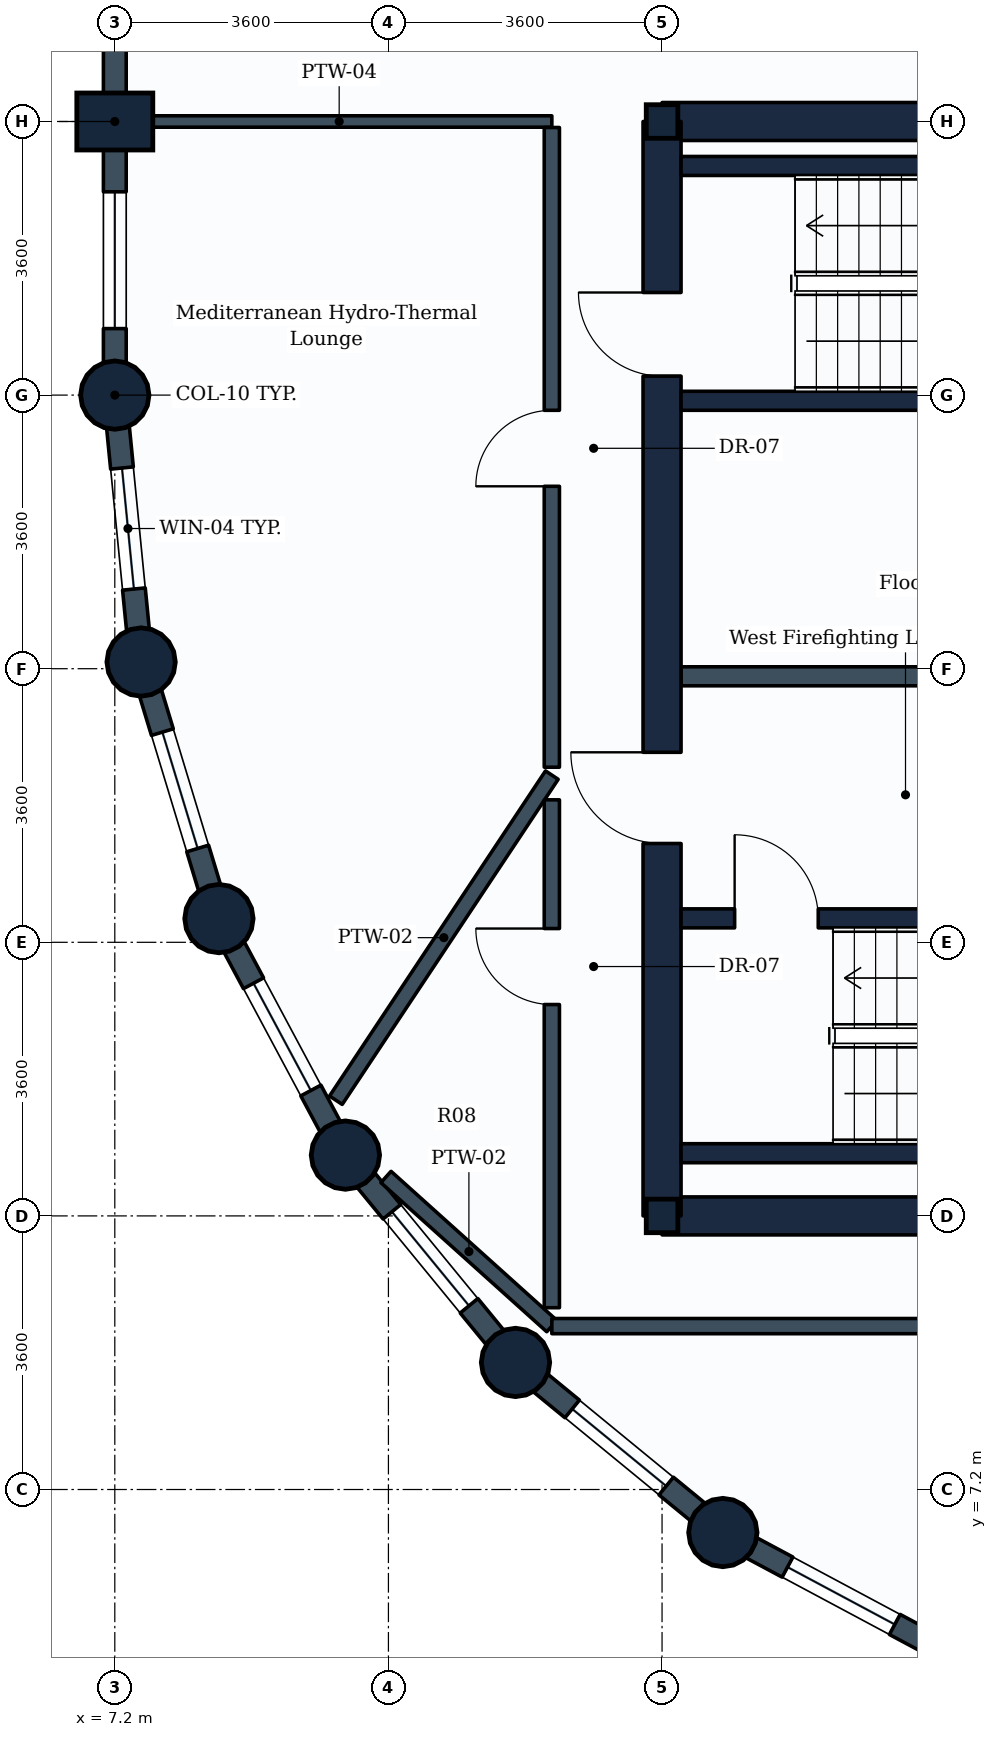
"""IFC4 building model, lengths in metres.
Left out: names, types, materials, properties, quantities, classifications, styles, units other than length and angle.
Written with IfcOpenShell. Run it as: python <this file> out.ifc"""

import sys

from ifc_helpers import new_model, si_unit, direction, frame, frame_2d, origin, origin_2d, place, context, subcontext, project, spatial, rectangle, circle, i_section, extrude, element, fill, save


model = new_model("IFC4")
c1 = context("Model", 3, precision=1e-05, world=origin(), true_north=direction((0.0, 1.0)))
c2 = subcontext(c1, "Body", "Model", "MODEL_VIEW")
j1 = project(units=[si_unit("LENGTHUNIT", "METRE"), si_unit("PLANEANGLEUNIT", "RADIAN")], contexts=[c1])
p1 = place(None, origin())
s1 = spatial("IfcSite", under=j1, at=p1, CompositionType="ELEMENT")
p2 = place(p1, origin())
s2 = spatial("IfcBuilding", under=s1, at=p2, CompositionType="ELEMENT")
p3 = place(p2, frame((0.0, 0.0, 165.6)))
s3 = spatial("IfcBuildingStorey", under=s2, at=p3, CompositionType="ELEMENT", Elevation=165.6)
p4 = place(p3, frame((7.2, 21.6, 0.0), z_axis=(0.0, 0.0, 1.0), x_axis=(1.0, 0.0, 0.0)))
e1 = element("IfcColumn", 1, at=p4, inside=s3, PredefinedType="COLUMN", context=c2, shape_type="SweptSolid", body=[
    extrude(circle(Radius=0.45, at=origin_2d()), origin(), (0.0, 0.0, 1.0), 3.8),
])
p5 = place(p3, frame((7.2, 25.2, 0.0), z_axis=(0.0, 0.0, 1.0), x_axis=(0.0, 1.0, 0.0)))
e2 = element("IfcColumn", 2, at=p5, inside=s3, PredefinedType="COLUMN", context=c2, shape_type="SweptSolid", body=[
    extrude(rectangle(XDim=0.75, YDim=1.0, at=origin_2d()), origin(), (0.0, 0.0, 1.0), 3.8),
])
for number, where, z_axis, x_axis in (
    (3, (7.546, 18.088, 0.0), (0.0, 0.0, 1.0), (1.0, 0.0, 0.0)),
    (4, (8.57, 14.712, 0.0), (0.0, 0.0, 1.0), (1.0, 0.0, 0.0)),
    (5, (10.234, 11.6, 0.0), (0.0, 0.0, 1.0), (1.0, 0.0, 0.0)),
    (6, (12.472, 8.872, 0.0), (0.0, 0.0, 1.0), (1.0, 0.0, 0.0)),
):
    element("IfcColumn", number, at=place(p3, frame(where, z_axis=z_axis, x_axis=x_axis)), inside=s3, PredefinedType="COLUMN", context=c2, shape_type="SweptSolid", body=[
        extrude(circle(Radius=0.45, at=origin_2d()), origin(), (0.0, 0.0, 1.0), 3.8),
    ])
for number, where, z_axis, x_axis in (
    (7, (14.4, 10.8, 0.0), (0.0, 0.0, 1.0), (1.0, 0.0, 0.0)),
    (8, (14.4, 25.2, 0.0), (0.0, 0.0, 1.0), (1.0, 0.0, 0.0)),
):
    element("IfcColumn", number, at=place(p3, frame(where, z_axis=z_axis, x_axis=x_axis)), inside=s3, PredefinedType="COLUMN", context=c2, shape_type="SweptSolid", body=[
        extrude(i_section(OverallWidth=0.416, OverallDepth=0.442, WebThickness=0.025, FlangeThickness=0.041, FilletRadius=0.015, at=origin_2d()), origin(), (0.0, 0.0, 1.0), 3.8),
    ])
p6 = place(p3, frame((15.2, 6.634, 0.0), z_axis=(0.0, 0.0, 1.0), x_axis=(1.0, 0.0, 0.0)))
e9 = element("IfcColumn", 9, at=p6, inside=s3, PredefinedType="COLUMN", context=c2, shape_type="SweptSolid", body=[
    extrude(circle(Radius=0.45, at=origin_2d()), origin(), (0.0, 0.0, 1.0), 3.8),
])
p7 = place(p3, frame((7.2, 25.2, 0.0), z_axis=(0.0, 0.0, 1.0), x_axis=(0.0, 1.0, 0.0)))
e10 = element("IfcWall", 10, at=p7, inside=s3, PredefinedType="STANDARD", context=c2, shape_type="SweptSolid", body=[
    extrude(rectangle(XDim=3.6, YDim=0.3, at=frame_2d((1.8, 0.0))), origin(), (0.0, 0.0, 1.0), 2.93),
])
p8 = place(p3, frame((7.2, 21.6, 0.0), z_axis=(0.0, 0.0, 1.0), x_axis=(0.0, 1.0, 0.0)))
e11 = element("IfcWall", 11, at=p8, inside=s3, PredefinedType="STANDARD", context=c2, shape_type="SweptSolid", body=[
    extrude(rectangle(XDim=3.6, YDim=0.3, at=frame_2d((1.8, 0.0))), origin(), (0.0, 0.0, 1.0), 2.93),
])
p9 = place(p8, frame((0.875, 0.0, 0.85)))
e12 = element("IfcOpeningElement", 12, at=p9, cuts=e11, PredefinedType="OPENING", context=c2, shape_type="SweptSolid", body=[
    extrude(rectangle(XDim=1.8, YDim=1.35, at=frame_2d((0.9, 0.675))), frame((0.0, 0.16, 0.0), z_axis=(0.0, -1.0, 0.0), x_axis=(1.0, 0.0, 0.0)), (0.0, 0.0, 1.0), 0.32),
])
p10 = place(p3, frame((7.546, 18.088, 0.0), z_axis=(0.0, 0.0, 1.0), x_axis=(-0.09802417461, 0.995184033831, 0.0)))
e13 = element("IfcWall", 13, at=p10, inside=s3, PredefinedType="STANDARD", context=c2, shape_type="SweptSolid", body=[
    extrude(rectangle(XDim=3.529, YDim=0.3, at=frame_2d((1.765, 0.0))), origin(), (0.0, 0.0, 1.0), 2.93),
])
p11 = place(p10, frame((0.965, 0.0, 0.85)))
e14 = element("IfcOpeningElement", 14, at=p11, cuts=e13, PredefinedType="OPENING", context=c2, shape_type="SweptSolid", body=[
    extrude(rectangle(XDim=1.6, YDim=1.35, at=frame_2d((0.8, 0.675))), frame((0.0, 0.16, 0.0), z_axis=(0.0, -1.0, 0.0), x_axis=(1.0, 0.0, 0.0)), (0.0, 0.0, 1.0), 0.32),
])
p12 = place(p3, frame((8.57, 14.712, 0.0), z_axis=(0.0, 0.0, 1.0), x_axis=(-0.290305086481, 0.956934144423, 0.0)))
e15 = element("IfcWall", 15, at=p12, inside=s3, PredefinedType="STANDARD", context=c2, shape_type="SweptSolid", body=[
    extrude(rectangle(XDim=3.528, YDim=0.3, at=frame_2d((1.764, 0.0))), origin(), (0.0, 0.0, 1.0), 2.93),
])
p13 = place(p12, frame((0.964, 0.0, 0.85)))
e16 = element("IfcOpeningElement", 16, at=p13, cuts=e15, PredefinedType="OPENING", context=c2, shape_type="SweptSolid", body=[
    extrude(rectangle(XDim=1.6, YDim=1.35, at=frame_2d((0.8, 0.675))), frame((0.0, 0.16, 0.0), z_axis=(0.0, -1.0, 0.0), x_axis=(1.0, 0.0, 0.0)), (0.0, 0.0, 1.0), 0.32),
])
p14 = place(p3, frame((10.234, 11.6, 0.0), z_axis=(0.0, 0.0, 1.0), x_axis=(-0.47151087309, 0.881860247748, 0.0)))
e17 = element("IfcWall", 17, at=p14, inside=s3, PredefinedType="STANDARD", context=c2, shape_type="SweptSolid", body=[
    extrude(rectangle(XDim=3.529, YDim=0.3, at=frame_2d((1.764, 0.0))), origin(), (0.0, 0.0, 1.0), 2.93),
])
p15 = place(p14, frame((0.964, 0.0, 0.85)))
e18 = element("IfcOpeningElement", 18, at=p15, cuts=e17, PredefinedType="OPENING", context=c2, shape_type="SweptSolid", body=[
    extrude(rectangle(XDim=1.6, YDim=1.35, at=frame_2d((0.8, 0.675))), frame((0.0, 0.16, 0.0), z_axis=(0.0, -1.0, 0.0), x_axis=(1.0, 0.0, 0.0)), (0.0, 0.0, 1.0), 0.32),
])
p16 = place(p3, frame((12.472, 8.872, 0.0), z_axis=(0.0, 0.0, 1.0), x_axis=(-0.634258295121, 0.773121216285, 0.0)))
e19 = element("IfcWall", 19, at=p16, inside=s3, PredefinedType="STANDARD", context=c2, shape_type="SweptSolid", body=[
    extrude(rectangle(XDim=3.529, YDim=0.3, at=frame_2d((1.764, 0.0))), origin(), (0.0, 0.0, 1.0), 2.93),
])
p17 = place(p16, frame((0.964, 0.0, 0.85)))
e20 = element("IfcOpeningElement", 20, at=p17, cuts=e19, PredefinedType="OPENING", context=c2, shape_type="SweptSolid", body=[
    extrude(rectangle(XDim=1.6, YDim=1.35, at=frame_2d((0.8, 0.675))), frame((0.0, 0.16, 0.0), z_axis=(0.0, -1.0, 0.0), x_axis=(1.0, 0.0, 0.0)), (0.0, 0.0, 1.0), 0.32),
])
p18 = place(p3, frame((15.2, 6.634, 0.0), z_axis=(0.0, 0.0, 1.0), x_axis=(-0.773121216285, 0.634258295121, 0.0)))
e21 = element("IfcWall", 21, at=p18, inside=s3, PredefinedType="STANDARD", context=c2, shape_type="SweptSolid", body=[
    extrude(rectangle(XDim=3.529, YDim=0.3, at=frame_2d((1.764, 0.0))), origin(), (0.0, 0.0, 1.0), 2.93),
])
p19 = place(p18, frame((0.964, 0.0, 0.85)))
e22 = element("IfcOpeningElement", 22, at=p19, cuts=e21, PredefinedType="OPENING", context=c2, shape_type="SweptSolid", body=[
    extrude(rectangle(XDim=1.6, YDim=1.35, at=frame_2d((0.8, 0.675))), frame((0.0, 0.16, 0.0), z_axis=(0.0, -1.0, 0.0), x_axis=(1.0, 0.0, 0.0)), (0.0, 0.0, 1.0), 0.32),
])
p20 = place(p3, frame((18.312, 4.97, 0.0), z_axis=(0.0, 0.0, 1.0), x_axis=(-0.881846862014, 0.471535907389, 0.0)))
e23 = element("IfcWall", 23, at=p20, inside=s3, PredefinedType="STANDARD", context=c2, shape_type="SweptSolid", body=[
    extrude(rectangle(XDim=3.529, YDim=0.3, at=frame_2d((1.765, 0.0))), origin(), (0.0, 0.0, 1.0), 2.93),
])
p21 = place(p20, frame((0.964, 0.0, 0.85)))
e24 = element("IfcOpeningElement", 24, at=p21, cuts=e23, PredefinedType="OPENING", context=c2, shape_type="SweptSolid", body=[
    extrude(rectangle(XDim=1.6, YDim=1.35, at=frame_2d((0.8, 0.675))), frame((0.0, 0.16, 0.0), z_axis=(0.0, -1.0, 0.0), x_axis=(1.0, 0.0, 0.0)), (0.0, 0.0, 1.0), 0.32),
])
p22 = place(p3, frame((14.4, 10.8, 0.0), z_axis=(0.0, 0.0, 1.0), x_axis=(1.0, 0.0, 0.0)))
e25 = element("IfcWall", 25, at=p22, inside=s3, PredefinedType="SHEAR", context=c2, shape_type="SweptSolid", body=[
    extrude(rectangle(XDim=18.0, YDim=0.5, at=frame_2d((9.0, 0.0))), origin(), (0.0, 0.0, 1.0), 3.48),
])
p23 = place(p3, frame((14.4, 25.2, 0.0), z_axis=(0.0, 0.0, 1.0), x_axis=(1.0, 0.0, 0.0)))
e26 = element("IfcWall", 26, at=p23, inside=s3, PredefinedType="SHEAR", context=c2, shape_type="SweptSolid", body=[
    extrude(rectangle(XDim=14.4, YDim=0.5, at=frame_2d((7.2, 0.0))), origin(), (0.0, 0.0, 1.0), 3.48),
])
p24 = place(p3, frame((14.4, 10.8, 0.0), z_axis=(0.0, 0.0, 1.0), x_axis=(0.0, 1.0, 0.0)))
e27 = element("IfcWall", 27, at=p24, inside=s3, PredefinedType="SHEAR", context=c2, shape_type="SweptSolid", body=[
    extrude(rectangle(XDim=14.4, YDim=0.5, at=frame_2d((7.2, 0.0))), origin(), (0.0, 0.0, 1.0), 3.48),
])
p25 = place(p24, frame((11.05, 0.0, 0.0)))
e28 = element("IfcOpeningElement", 28, at=p25, cuts=e27, PredefinedType="OPENING", context=c2, shape_type="SweptSolid", body=[
    extrude(rectangle(XDim=1.1, YDim=2.1, at=frame_2d((0.55, 1.05))), frame((0.0, 0.26, 0.0), z_axis=(0.0, -1.0, 0.0), x_axis=(1.0, 0.0, 0.0)), (0.0, 0.0, 1.0), 0.52),
])
p26 = place(p24, frame((4.9, 0.0, 0.0)))
e29 = element("IfcOpeningElement", 29, at=p26, cuts=e27, PredefinedType="OPENING", context=c2, shape_type="SweptSolid", body=[
    extrude(rectangle(XDim=1.2, YDim=2.1, at=frame_2d((0.6, 1.05))), frame((0.0, 0.26, 0.0), z_axis=(0.0, -1.0, 0.0), x_axis=(1.0, 0.0, 0.0)), (0.0, 0.0, 1.0), 0.52),
])
p27 = place(p3, frame((14.65, 11.625, 0.0), z_axis=(0.0, 0.0, 1.0), x_axis=(1.0, 0.0, 0.0)))
e30 = element("IfcWall", 30, at=p27, inside=s3, PredefinedType="SHEAR", context=c2, shape_type="SweptSolid", body=[
    extrude(rectangle(XDim=8.7, YDim=0.25, at=frame_2d((4.35, 0.0))), origin(), (0.0, 0.0, 1.0), 3.48),
])
p28 = place(p3, frame((14.65, 14.715, 0.0), z_axis=(0.0, 0.0, 1.0), x_axis=(1.0, 0.0, 0.0)))
e31 = element("IfcWall", 31, at=p28, inside=s3, PredefinedType="SHEAR", context=c2, shape_type="SweptSolid", body=[
    extrude(rectangle(XDim=8.7, YDim=0.25, at=frame_2d((4.35, 0.0))), origin(), (0.0, 0.0, 1.0), 3.48),
])
p29 = place(p28, frame((0.705, 0.0, 0.0)))
e32 = element("IfcOpeningElement", 32, at=p29, cuts=e31, PredefinedType="OPENING", context=c2, shape_type="SweptSolid", body=[
    extrude(rectangle(XDim=1.1, YDim=2.1, at=frame_2d((0.55, 1.05))), frame((0.0, 0.135, 0.0), z_axis=(0.0, -1.0, 0.0), x_axis=(1.0, 0.0, 0.0)), (0.0, 0.0, 1.0), 0.27),
])
for number, where, z_axis, x_axis in (
    (33, (14.65, 21.525, 0.0), (0.0, 0.0, 1.0), (1.0, 0.0, 0.0)),
    (34, (14.65, 24.615, 0.0), (0.0, 0.0, 1.0), (1.0, 0.0, 0.0)),
):
    element("IfcWall", number, at=place(p3, frame(where, z_axis=z_axis, x_axis=x_axis)), inside=s3, PredefinedType="SHEAR", context=c2, shape_type="SweptSolid", body=[
        extrude(rectangle(XDim=8.25, YDim=0.25, at=frame_2d((4.125, 0.0))), origin(), (0.0, 0.0, 1.0), 3.48),
    ])
p30 = place(p3, frame((14.65, 17.9, 0.0), z_axis=(0.0, 0.0, 1.0), x_axis=(1.0, 0.0, 0.0)))
e35 = element("IfcWall", 35, at=p30, inside=s3, PredefinedType="PARTITIONING", context=c2, shape_type="SweptSolid", body=[
    extrude(rectangle(XDim=7.15, YDim=0.25, at=frame_2d((3.575, 0.0))), origin(), (0.0, 0.0, 1.0), 3.465),
])
p31 = place(p3, frame((7.354, 25.2, 0.0), z_axis=(0.0, 0.0, 1.0), x_axis=(1.0, 0.0, 0.0)))
e36 = element("IfcWall", 36, at=p31, inside=s3, PredefinedType="PARTITIONING", context=c2, shape_type="SweptSolid", body=[
    extrude(rectangle(XDim=5.596, YDim=0.15, at=frame_2d((2.798, 0.0))), origin(), (0.0, 0.0, 1.0), 3.465),
])
p32 = place(p3, frame((12.95, 9.35, 0.0), z_axis=(0.0, 0.0, 1.0), x_axis=(-0.743629108244, 0.66859236413, 0.0)))
e37 = element("IfcWall", 37, at=p32, inside=s3, PredefinedType="PARTITIONING", context=c2, shape_type="SweptSolid", body=[
    extrude(rectangle(XDim=2.935, YDim=0.2, at=frame_2d((1.467, 0.0))), origin(), (0.0, 0.0, 1.0), 2.93),
])
p33 = place(p3, frame((12.95, 16.6, 0.0), z_axis=(0.0, 0.0, 1.0), x_axis=(-0.553273174501, -0.832999876577, 0.0)))
e38 = element("IfcWall", 38, at=p33, inside=s3, PredefinedType="PARTITIONING", context=c2, shape_type="SweptSolid", body=[
    extrude(rectangle(XDim=5.135, YDim=0.2, at=frame_2d((2.568, 0.0))), origin(), (0.0, 0.0, 1.0), 2.93),
])
p34 = place(p3, frame((12.95, 16.704, 0.0), z_axis=(0.0, 0.0, 1.0), x_axis=(0.0, 1.0, 0.0)))
e39 = element("IfcWall", 39, at=p34, inside=s3, PredefinedType="PARTITIONING", context=c2, shape_type="SweptSolid", body=[
    extrude(rectangle(XDim=8.417, YDim=0.2, at=frame_2d((4.208, 0.0))), origin(), (0.0, 0.0, 1.0), 3.11),
])
p35 = place(p34, frame((3.696, 0.0, 0.0)))
e40 = element("IfcOpeningElement", 40, at=p35, cuts=e39, PredefinedType="OPENING", context=c2, shape_type="SweptSolid", body=[
    extrude(rectangle(XDim=1.0, YDim=2.1, at=frame_2d((0.5, 1.05))), frame((0.0, 0.11, 0.0), z_axis=(0.0, -1.0, 0.0), x_axis=(1.0, 0.0, 0.0)), (0.0, 0.0, 1.0), 0.22),
])
p36 = place(p3, frame((12.95, 9.592, 0.0), z_axis=(0.0, 0.0, 1.0), x_axis=(0.0, 1.0, 0.0)))
e41 = element("IfcWall", 41, at=p36, inside=s3, PredefinedType="PARTITIONING", context=c2, shape_type="SweptSolid", body=[
    extrude(rectangle(XDim=6.683, YDim=0.2, at=frame_2d((3.341, 0.0))), origin(), (0.0, 0.0, 1.0), 3.1),
])
p37 = place(p36, frame((3.989, 0.0, 0.0)))
e42 = element("IfcOpeningElement", 42, at=p37, cuts=e41, PredefinedType="OPENING", context=c2, shape_type="SweptSolid", body=[
    extrude(rectangle(XDim=1.0, YDim=2.1, at=frame_2d((0.5, 1.05))), frame((0.0, 0.11, 0.0), z_axis=(0.0, -1.0, 0.0), x_axis=(1.0, 0.0, 0.0)), (0.0, 0.0, 1.0), 0.22),
])
p38 = place(p3, frame((12.95, 9.35, 0.0), z_axis=(0.0, 0.0, 1.0), x_axis=(1.0, 0.0, 0.0)))
e43 = element("IfcWall", 43, at=p38, inside=s3, PredefinedType="PARTITIONING", context=c2, shape_type="SweptSolid", body=[
    extrude(rectangle(XDim=15.771, YDim=0.2, at=frame_2d((7.885, 0.0))), origin(), (0.0, 0.0, 1.0), 3.1),
])
p39 = place(p38, frame((4.836, 0.0, 0.0)))
e44 = element("IfcOpeningElement", 44, at=p39, cuts=e43, PredefinedType="OPENING", context=c2, shape_type="SweptSolid", body=[
    extrude(rectangle(XDim=1.0, YDim=2.1, at=frame_2d((0.5, 1.05))), frame((0.0, 0.11, 0.0), z_axis=(0.0, -1.0, 0.0), x_axis=(1.0, 0.0, 0.0)), (0.0, 0.0, 1.0), 0.22),
])
p40 = place(p9, origin())
e45 = element("IfcWindow", 45, at=p40, inside=s3, PartitioningType="SINGLE_PANEL", PredefinedType="WINDOW", context=c2, shape_type="SweptSolid", body=[
    extrude(rectangle(XDim=1.8, YDim=1.35, at=frame_2d((0.9, 0.675))), frame((0.0, 0.03, 0.0), z_axis=(0.0, -1.0, 0.0), x_axis=(1.0, 0.0, 0.0)), (0.0, 0.0, 1.0), 0.06),
])
fill(e12, e45)
p41 = place(p11, origin())
e46 = element("IfcWindow", 46, at=p41, inside=s3, PartitioningType="SINGLE_PANEL", PredefinedType="WINDOW", context=c2, shape_type="SweptSolid", body=[
    extrude(rectangle(XDim=1.6, YDim=1.35, at=frame_2d((0.8, 0.675))), frame((0.0, 0.03, 0.0), z_axis=(0.0, -1.0, 0.0), x_axis=(1.0, 0.0, 0.0)), (0.0, 0.0, 1.0), 0.06),
])
fill(e14, e46)
p42 = place(p13, origin())
e47 = element("IfcWindow", 47, at=p42, inside=s3, PartitioningType="SINGLE_PANEL", PredefinedType="WINDOW", context=c2, shape_type="SweptSolid", body=[
    extrude(rectangle(XDim=1.6, YDim=1.35, at=frame_2d((0.8, 0.675))), frame((0.0, 0.03, 0.0), z_axis=(0.0, -1.0, 0.0), x_axis=(1.0, 0.0, 0.0)), (0.0, 0.0, 1.0), 0.06),
])
fill(e16, e47)
p43 = place(p15, origin())
e48 = element("IfcWindow", 48, at=p43, inside=s3, PartitioningType="SINGLE_PANEL", PredefinedType="WINDOW", context=c2, shape_type="SweptSolid", body=[
    extrude(rectangle(XDim=1.6, YDim=1.35, at=frame_2d((0.8, 0.675))), frame((0.0, 0.03, 0.0), z_axis=(0.0, -1.0, 0.0), x_axis=(1.0, 0.0, 0.0)), (0.0, 0.0, 1.0), 0.06),
])
fill(e18, e48)
p44 = place(p17, origin())
e49 = element("IfcWindow", 49, at=p44, inside=s3, PartitioningType="SINGLE_PANEL", PredefinedType="WINDOW", context=c2, shape_type="SweptSolid", body=[
    extrude(rectangle(XDim=1.6, YDim=1.35, at=frame_2d((0.8, 0.675))), frame((0.0, 0.03, 0.0), z_axis=(0.0, -1.0, 0.0), x_axis=(1.0, 0.0, 0.0)), (0.0, 0.0, 1.0), 0.06),
])
fill(e20, e49)
p45 = place(p19, origin())
e50 = element("IfcWindow", 50, at=p45, inside=s3, PartitioningType="SINGLE_PANEL", PredefinedType="WINDOW", context=c2, shape_type="SweptSolid", body=[
    extrude(rectangle(XDim=1.6, YDim=1.35, at=frame_2d((0.8, 0.675))), frame((0.0, 0.03, 0.0), z_axis=(0.0, -1.0, 0.0), x_axis=(1.0, 0.0, 0.0)), (0.0, 0.0, 1.0), 0.06),
])
fill(e22, e50)
p46 = place(p21, origin())
e51 = element("IfcWindow", 51, at=p46, inside=s3, PartitioningType="SINGLE_PANEL", PredefinedType="WINDOW", context=c2, shape_type="SweptSolid", body=[
    extrude(rectangle(XDim=1.6, YDim=1.35, at=frame_2d((0.8, 0.675))), frame((0.0, 0.03, 0.0), z_axis=(0.0, -1.0, 0.0), x_axis=(1.0, 0.0, 0.0)), (0.0, 0.0, 1.0), 0.06),
])
fill(e24, e51)
p47 = place(p29, origin())
e52 = element("IfcDoor", 52, at=p47, inside=s3, OperationType="SINGLE_SWING_LEFT", PredefinedType="DOOR", context=c2, shape_type="SweptSolid", body=[
    extrude(rectangle(XDim=1.1, YDim=2.1, at=frame_2d((0.55, 1.05))), frame((0.0, 0.025, 0.0), z_axis=(0.0, -1.0, 0.0), x_axis=(1.0, 0.0, 0.0)), (0.0, 0.0, 1.0), 0.05),
])
fill(e32, e52)
p48 = place(p25, origin())
e53 = element("IfcDoor", 53, at=p48, inside=s3, OperationType="SINGLE_SWING_RIGHT", PredefinedType="DOOR", context=c2, shape_type="SweptSolid", body=[
    extrude(rectangle(XDim=1.1, YDim=2.1, at=frame_2d((0.55, 1.05))), frame((0.0, 0.025, 0.0), z_axis=(0.0, -1.0, 0.0), x_axis=(1.0, 0.0, 0.0)), (0.0, 0.0, 1.0), 0.05),
])
fill(e28, e53)
p49 = place(p26, origin())
e54 = element("IfcDoor", 54, at=p49, inside=s3, OperationType="SINGLE_SWING_RIGHT", PredefinedType="DOOR", context=c2, shape_type="SweptSolid", body=[
    extrude(rectangle(XDim=1.2, YDim=2.1, at=frame_2d((0.6, 1.05))), frame((0.0, 0.025, 0.0), z_axis=(0.0, -1.0, 0.0), x_axis=(1.0, 0.0, 0.0)), (0.0, 0.0, 1.0), 0.05),
])
fill(e29, e54)
p50 = place(p35, origin())
e55 = element("IfcDoor", 55, at=p50, inside=s3, OperationType="SINGLE_SWING_LEFT", PredefinedType="DOOR", context=c2, shape_type="SweptSolid", body=[
    extrude(rectangle(XDim=1.0, YDim=2.1, at=frame_2d((0.5, 1.05))), frame((0.0, 0.025, 0.0), z_axis=(0.0, -1.0, 0.0), x_axis=(1.0, 0.0, 0.0)), (0.0, 0.0, 1.0), 0.05),
])
fill(e40, e55)
p51 = place(p37, origin())
e56 = element("IfcDoor", 56, at=p51, inside=s3, OperationType="SINGLE_SWING_RIGHT", PredefinedType="DOOR", context=c2, shape_type="SweptSolid", body=[
    extrude(rectangle(XDim=1.0, YDim=2.1, at=frame_2d((0.5, 1.05))), frame((0.0, 0.025, 0.0), z_axis=(0.0, -1.0, 0.0), x_axis=(1.0, 0.0, 0.0)), (0.0, 0.0, 1.0), 0.05),
])
fill(e42, e56)
save(model, sys.argv[1])
